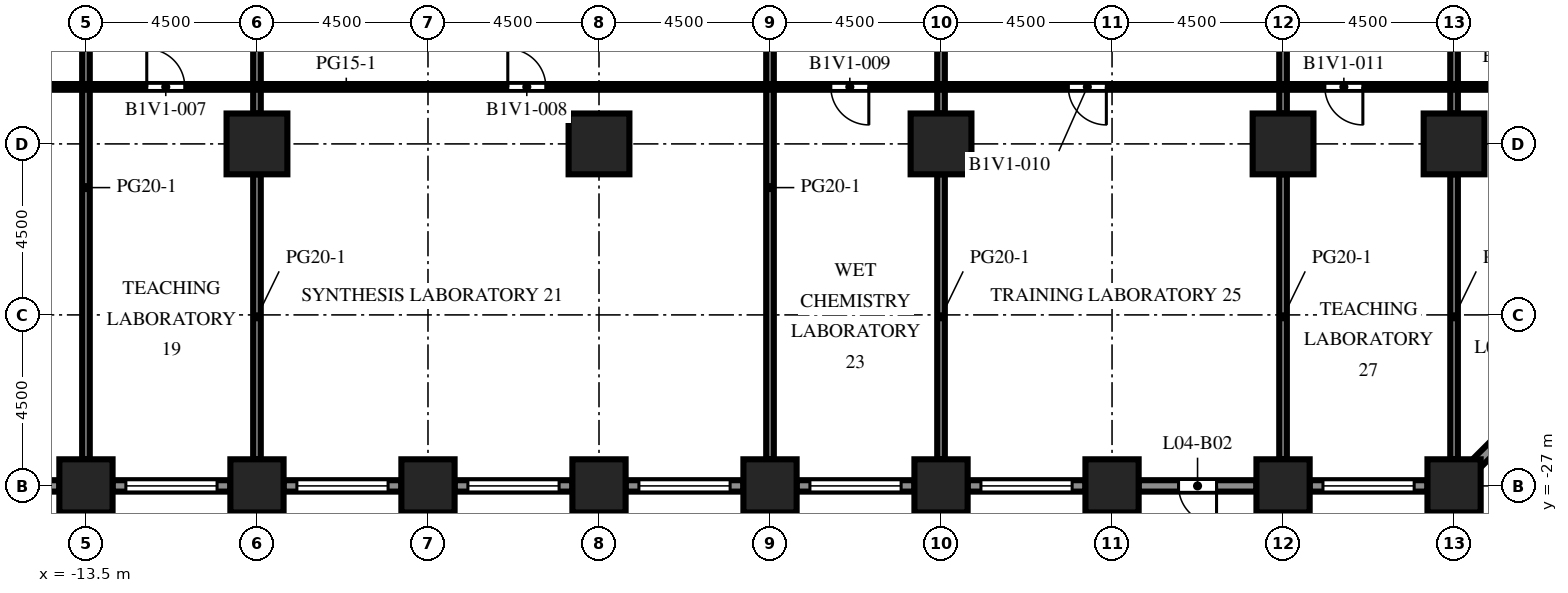
"""IFC4 building model, lengths in metres.
Left out: names, types, materials, properties, quantities, classifications, styles, units other than length and angle.
Written with IfcOpenShell. Run it as: python <this file> out.ifc"""

import sys

from ifc_helpers import new_model, si_unit, direction, frame, frame_2d, origin, origin_2d, place, context, subcontext, project, spatial, rectangle, extrude, element, fill, save


model = new_model("IFC4")
c1 = context("Model", 3, precision=1e-05, world=origin(), true_north=direction((0.0, 1.0)))
c2 = subcontext(c1, "Body", "Model", "MODEL_VIEW")
j1 = project(units=[si_unit("LENGTHUNIT", "METRE"), si_unit("PLANEANGLEUNIT", "RADIAN")], contexts=[c1])
p1 = place(None, origin())
s1 = spatial("IfcSite", under=j1, at=p1, CompositionType="ELEMENT")
p2 = place(p1, origin())
s2 = spatial("IfcBuilding", under=s1, at=p2, CompositionType="ELEMENT")
p3 = place(p2, frame((0.0, 0.0, 19.5)))
s3 = spatial("IfcBuildingStorey", under=s2, at=p3, CompositionType="ELEMENT", Elevation=19.5)
for number, where, z_axis, x_axis in (
    (1, (-13.5, -27.0, 0.0), (0.0, 0.0, 1.0), (1.0, 0.0, 0.0)),
    (2, (-9.0, -27.0, 0.0), (0.0, 0.0, 1.0), (1.0, 0.0, 0.0)),
    (3, (-4.5, -27.0, 0.0), (0.0, 0.0, 1.0), (1.0, 0.0, 0.0)),
    (4, (0.0, -27.0, 0.0), (0.0, 0.0, 1.0), (1.0, 0.0, 0.0)),
    (5, (4.5, -27.0, 0.0), (0.0, 0.0, 1.0), (1.0, 0.0, 0.0)),
    (6, (9.0, -27.0, 0.0), (0.0, 0.0, 1.0), (1.0, 0.0, 0.0)),
    (7, (13.5, -27.0, 0.0), (0.0, 0.0, 1.0), (1.0, 0.0, 0.0)),
    (8, (18.0, -27.0, 0.0), (0.0, 0.0, 1.0), (1.0, 0.0, 0.0)),
    (9, (22.5, -27.0, 0.0), (0.0, 0.0, 1.0), (1.0, 0.0, 0.0)),
):
    element("IfcColumn", number, at=place(p3, frame(where, z_axis=z_axis, x_axis=x_axis)), inside=s3, PredefinedType="COLUMN", context=c2, shape_type="SweptSolid", body=[
        extrude(rectangle(XDim=1.4, YDim=1.4, at=origin_2d()), origin(), (0.0, 0.0, 1.0), 4.1),
    ])
for number, where, z_axis, x_axis in (
    (10, (-9.0, -18.0, 0.0), (0.0, 0.0, 1.0), (1.0, 0.0, 0.0)),
    (11, (0.0, -18.0, 0.0), (0.0, 0.0, 1.0), (1.0, 0.0, 0.0)),
    (12, (9.0, -18.0, 0.0), (0.0, 0.0, 1.0), (1.0, 0.0, 0.0)),
    (13, (18.0, -18.0, 0.0), (0.0, 0.0, 1.0), (1.0, 0.0, 0.0)),
    (14, (22.5, -18.0, 0.0), (0.0, 0.0, 1.0), (1.0, 0.0, 0.0)),
):
    element("IfcColumn", number, at=place(p3, frame(where, z_axis=z_axis, x_axis=x_axis)), inside=s3, PredefinedType="COLUMN", context=c2, shape_type="SweptSolid", body=[
        extrude(rectangle(XDim=1.6, YDim=1.6, at=origin_2d()), origin(), (0.0, 0.0, 1.0), 4.1),
    ])
p4 = place(p3, frame((-14.2, -27.0, 0.0), z_axis=(0.0, 0.0, 1.0), x_axis=(-1.0, 0.0, 0.0)))
e15 = element("IfcWall", 15, at=p4, inside=s3, PredefinedType="SOLIDWALL", context=c2, shape_type="SweptSolid", body=[
    extrude(rectangle(XDim=3.1, YDim=0.3, at=frame_2d((1.55, 0.0))), origin(), (0.0, 0.0, 1.0), 2.75),
])
p5 = place(p4, frame((1.05, 0.0, 0.0)))
e16 = element("IfcOpeningElement", 16, at=p5, cuts=e15, PredefinedType="OPENING", context=c2, shape_type="SweptSolid", body=[
    extrude(rectangle(XDim=1.0, YDim=2.2, at=frame_2d((0.5, 1.1))), frame((0.0, 0.16, 0.0), z_axis=(0.0, -1.0, 0.0), x_axis=(1.0, 0.0, 0.0)), (0.0, 0.0, 1.0), 0.32),
])
p6 = place(p3, frame((-9.7, -27.0, 0.0), z_axis=(0.0, 0.0, 1.0), x_axis=(-1.0, 0.0, 0.0)))
e17 = element("IfcWall", 17, at=p6, inside=s3, PredefinedType="SOLIDWALL", context=c2, shape_type="SweptSolid", body=[
    extrude(rectangle(XDim=3.1, YDim=0.3, at=frame_2d((1.55, 0.0))), origin(), (0.0, 0.0, 1.0), 2.75),
])
p7 = place(p6, frame((0.35, 0.0, 0.8)))
e18 = element("IfcOpeningElement", 18, at=p7, cuts=e17, PredefinedType="OPENING", context=c2, shape_type="SweptSolid", body=[
    extrude(rectangle(XDim=2.4, YDim=1.7, at=frame_2d((1.2, 0.85))), frame((0.0, 0.16, 0.0), z_axis=(0.0, -1.0, 0.0), x_axis=(1.0, 0.0, 0.0)), (0.0, 0.0, 1.0), 0.32),
])
p8 = place(p3, frame((-5.2, -27.0, 0.0), z_axis=(0.0, 0.0, 1.0), x_axis=(-1.0, 0.0, 0.0)))
e19 = element("IfcWall", 19, at=p8, inside=s3, PredefinedType="SOLIDWALL", context=c2, shape_type="SweptSolid", body=[
    extrude(rectangle(XDim=3.1, YDim=0.3, at=frame_2d((1.55, 0.0))), origin(), (0.0, 0.0, 1.0), 2.75),
])
p9 = place(p8, frame((0.35, 0.0, 0.8)))
e20 = element("IfcOpeningElement", 20, at=p9, cuts=e19, PredefinedType="OPENING", context=c2, shape_type="SweptSolid", body=[
    extrude(rectangle(XDim=2.4, YDim=1.7, at=frame_2d((1.2, 0.85))), frame((0.0, 0.16, 0.0), z_axis=(0.0, -1.0, 0.0), x_axis=(1.0, 0.0, 0.0)), (0.0, 0.0, 1.0), 0.32),
])
p10 = place(p3, frame((-0.7, -27.0, 0.0), z_axis=(0.0, 0.0, 1.0), x_axis=(-1.0, 0.0, 0.0)))
e21 = element("IfcWall", 21, at=p10, inside=s3, PredefinedType="SOLIDWALL", context=c2, shape_type="SweptSolid", body=[
    extrude(rectangle(XDim=3.1, YDim=0.3, at=frame_2d((1.55, 0.0))), origin(), (0.0, 0.0, 1.0), 2.75),
])
p11 = place(p10, frame((0.35, 0.0, 0.8)))
e22 = element("IfcOpeningElement", 22, at=p11, cuts=e21, PredefinedType="OPENING", context=c2, shape_type="SweptSolid", body=[
    extrude(rectangle(XDim=2.4, YDim=1.7, at=frame_2d((1.2, 0.85))), frame((0.0, 0.16, 0.0), z_axis=(0.0, -1.0, 0.0), x_axis=(1.0, 0.0, 0.0)), (0.0, 0.0, 1.0), 0.32),
])
p12 = place(p3, frame((3.8, -27.0, 0.0), z_axis=(0.0, 0.0, 1.0), x_axis=(-1.0, 0.0, 0.0)))
e23 = element("IfcWall", 23, at=p12, inside=s3, PredefinedType="SOLIDWALL", context=c2, shape_type="SweptSolid", body=[
    extrude(rectangle(XDim=3.1, YDim=0.3, at=frame_2d((1.55, 0.0))), origin(), (0.0, 0.0, 1.0), 2.75),
])
p13 = place(p12, frame((0.35, 0.0, 0.8)))
e24 = element("IfcOpeningElement", 24, at=p13, cuts=e23, PredefinedType="OPENING", context=c2, shape_type="SweptSolid", body=[
    extrude(rectangle(XDim=2.4, YDim=1.7, at=frame_2d((1.2, 0.85))), frame((0.0, 0.16, 0.0), z_axis=(0.0, -1.0, 0.0), x_axis=(1.0, 0.0, 0.0)), (0.0, 0.0, 1.0), 0.32),
])
p14 = place(p3, frame((8.3, -27.0, 0.0), z_axis=(0.0, 0.0, 1.0), x_axis=(-1.0, 0.0, 0.0)))
e25 = element("IfcWall", 25, at=p14, inside=s3, PredefinedType="SOLIDWALL", context=c2, shape_type="SweptSolid", body=[
    extrude(rectangle(XDim=3.1, YDim=0.3, at=frame_2d((1.55, 0.0))), origin(), (0.0, 0.0, 1.0), 2.75),
])
p15 = place(p14, frame((0.35, 0.0, 0.8)))
e26 = element("IfcOpeningElement", 26, at=p15, cuts=e25, PredefinedType="OPENING", context=c2, shape_type="SweptSolid", body=[
    extrude(rectangle(XDim=2.4, YDim=1.7, at=frame_2d((1.2, 0.85))), frame((0.0, 0.16, 0.0), z_axis=(0.0, -1.0, 0.0), x_axis=(1.0, 0.0, 0.0)), (0.0, 0.0, 1.0), 0.32),
])
p16 = place(p3, frame((12.8, -27.0, 0.0), z_axis=(0.0, 0.0, 1.0), x_axis=(-1.0, 0.0, 0.0)))
e27 = element("IfcWall", 27, at=p16, inside=s3, PredefinedType="SOLIDWALL", context=c2, shape_type="SweptSolid", body=[
    extrude(rectangle(XDim=3.1, YDim=0.3, at=frame_2d((1.55, 0.0))), origin(), (0.0, 0.0, 1.0), 2.75),
])
p17 = place(p16, frame((0.35, 0.0, 0.8)))
e28 = element("IfcOpeningElement", 28, at=p17, cuts=e27, PredefinedType="OPENING", context=c2, shape_type="SweptSolid", body=[
    extrude(rectangle(XDim=2.4, YDim=1.7, at=frame_2d((1.2, 0.85))), frame((0.0, 0.16, 0.0), z_axis=(0.0, -1.0, 0.0), x_axis=(1.0, 0.0, 0.0)), (0.0, 0.0, 1.0), 0.32),
])
p18 = place(p3, frame((17.3, -27.0, 0.0), z_axis=(0.0, 0.0, 1.0), x_axis=(-1.0, 0.0, 0.0)))
e29 = element("IfcWall", 29, at=p18, inside=s3, PredefinedType="SOLIDWALL", context=c2, shape_type="SweptSolid", body=[
    extrude(rectangle(XDim=3.1, YDim=0.3, at=frame_2d((1.55, 0.0))), origin(), (0.0, 0.0, 1.0), 2.75),
])
p19 = place(p18, frame((1.05, 0.0, 0.0)))
e30 = element("IfcOpeningElement", 30, at=p19, cuts=e29, PredefinedType="OPENING", context=c2, shape_type="SweptSolid", body=[
    extrude(rectangle(XDim=1.0, YDim=2.2, at=frame_2d((0.5, 1.1))), frame((0.0, 0.16, 0.0), z_axis=(0.0, -1.0, 0.0), x_axis=(1.0, 0.0, 0.0)), (0.0, 0.0, 1.0), 0.32),
])
p20 = place(p3, frame((21.8, -27.0, 0.0), z_axis=(0.0, 0.0, 1.0), x_axis=(-1.0, 0.0, 0.0)))
e31 = element("IfcWall", 31, at=p20, inside=s3, PredefinedType="SOLIDWALL", context=c2, shape_type="SweptSolid", body=[
    extrude(rectangle(XDim=3.1, YDim=0.3, at=frame_2d((1.55, 0.0))), origin(), (0.0, 0.0, 1.0), 2.75),
])
p21 = place(p20, frame((0.35, 0.0, 0.8)))
e32 = element("IfcOpeningElement", 32, at=p21, cuts=e31, PredefinedType="OPENING", context=c2, shape_type="SweptSolid", body=[
    extrude(rectangle(XDim=2.4, YDim=1.7, at=frame_2d((1.2, 0.85))), frame((0.0, 0.16, 0.0), z_axis=(0.0, -1.0, 0.0), x_axis=(1.0, 0.0, 0.0)), (0.0, 0.0, 1.0), 0.32),
])
p22 = place(p3, frame((26.406, -23.094, 0.0), z_axis=(0.0, 0.0, 1.0), x_axis=(-0.707106781187, -0.707106781187, 0.0)))
e33 = element("IfcWall", 33, at=p22, inside=s3, PredefinedType="SOLIDWALL", context=c2, shape_type="SweptSolid", body=[
    extrude(rectangle(XDim=4.684, YDim=0.3, at=frame_2d((2.342, 0.0))), origin(), (0.0, 0.0, 1.0), 2.75),
])
p23 = place(p22, frame((1.742, 0.0, 0.0)))
e34 = element("IfcOpeningElement", 34, at=p23, cuts=e33, PredefinedType="OPENING", context=c2, shape_type="SweptSolid", body=[
    extrude(rectangle(XDim=1.2, YDim=2.2, at=frame_2d((0.6, 1.1))), frame((0.0, 0.16, 0.0), z_axis=(0.0, -1.0, 0.0), x_axis=(1.0, 0.0, 0.0)), (0.0, 0.0, 1.0), 0.32),
])
p24 = place(p3, frame((-13.5, -26.3, 0.0), z_axis=(0.0, 0.0, 1.0), x_axis=(0.0, 1.0, 0.0)))
e35 = element("IfcWall", 35, at=p24, inside=s3, PredefinedType="PARTITIONING", context=c2, shape_type="SweptSolid", body=[
    extrude(rectangle(XDim=14.3, YDim=0.2, at=frame_2d((7.15, 0.0))), origin(), (0.0, 0.0, 1.0), 3.65),
])
p25 = place(p3, frame((-9.0, -26.3, 0.0), z_axis=(0.0, 0.0, 1.0), x_axis=(0.0, 1.0, 0.0)))
e36 = element("IfcWall", 36, at=p25, inside=s3, PredefinedType="PARTITIONING", context=c2, shape_type="SweptSolid", body=[
    extrude(rectangle(XDim=7.5, YDim=0.2, at=frame_2d((3.75, 0.0))), origin(), (0.0, 0.0, 1.0), 3.65),
])
p26 = place(p3, frame((-9.0, -17.2, 0.0), z_axis=(0.0, 0.0, 1.0), x_axis=(0.0, 1.0, 0.0)))
e37 = element("IfcWall", 37, at=p26, inside=s3, PredefinedType="PARTITIONING", context=c2, shape_type="SweptSolid", body=[
    extrude(rectangle(XDim=5.2, YDim=0.2, at=frame_2d((2.6, 0.0))), origin(), (0.0, 0.0, 1.0), 3.65),
])
p27 = place(p3, frame((4.5, -26.3, 0.0), z_axis=(0.0, 0.0, 1.0), x_axis=(0.0, 1.0, 0.0)))
e38 = element("IfcWall", 38, at=p27, inside=s3, PredefinedType="PARTITIONING", context=c2, shape_type="SweptSolid", body=[
    extrude(rectangle(XDim=14.3, YDim=0.2, at=frame_2d((7.15, 0.0))), origin(), (0.0, 0.0, 1.0), 3.65),
])
p28 = place(p3, frame((9.0, -26.3, 0.0), z_axis=(0.0, 0.0, 1.0), x_axis=(0.0, 1.0, 0.0)))
e39 = element("IfcWall", 39, at=p28, inside=s3, PredefinedType="PARTITIONING", context=c2, shape_type="SweptSolid", body=[
    extrude(rectangle(XDim=7.5, YDim=0.2, at=frame_2d((3.75, 0.0))), origin(), (0.0, 0.0, 1.0), 3.65),
])
p29 = place(p3, frame((9.0, -17.2, 0.0), z_axis=(0.0, 0.0, 1.0), x_axis=(0.0, 1.0, 0.0)))
e40 = element("IfcWall", 40, at=p29, inside=s3, PredefinedType="PARTITIONING", context=c2, shape_type="SweptSolid", body=[
    extrude(rectangle(XDim=5.2, YDim=0.2, at=frame_2d((2.6, 0.0))), origin(), (0.0, 0.0, 1.0), 3.65),
])
p30 = place(p3, frame((18.0, -26.3, 0.0), z_axis=(0.0, 0.0, 1.0), x_axis=(0.0, 1.0, 0.0)))
e41 = element("IfcWall", 41, at=p30, inside=s3, PredefinedType="PARTITIONING", context=c2, shape_type="SweptSolid", body=[
    extrude(rectangle(XDim=7.5, YDim=0.2, at=frame_2d((3.75, 0.0))), origin(), (0.0, 0.0, 1.0), 3.65),
])
p31 = place(p3, frame((18.0, -17.2, 0.0), z_axis=(0.0, 0.0, 1.0), x_axis=(0.0, 1.0, 0.0)))
e42 = element("IfcWall", 42, at=p31, inside=s3, PredefinedType="PARTITIONING", context=c2, shape_type="SweptSolid", body=[
    extrude(rectangle(XDim=5.2, YDim=0.2, at=frame_2d((2.6, 0.0))), origin(), (0.0, 0.0, 1.0), 3.65),
])
p32 = place(p3, frame((22.5, -26.3, 0.0), z_axis=(0.0, 0.0, 1.0), x_axis=(0.0, 1.0, 0.0)))
e43 = element("IfcWall", 43, at=p32, inside=s3, PredefinedType="PARTITIONING", context=c2, shape_type="SweptSolid", body=[
    extrude(rectangle(XDim=7.5, YDim=0.2, at=frame_2d((3.75, 0.0))), origin(), (0.0, 0.0, 1.0), 3.65),
])
p33 = place(p3, frame((22.5, -17.2, 0.0), z_axis=(0.0, 0.0, 1.0), x_axis=(0.0, 1.0, 0.0)))
e44 = element("IfcWall", 44, at=p33, inside=s3, PredefinedType="PARTITIONING", context=c2, shape_type="SweptSolid", body=[
    extrude(rectangle(XDim=5.2, YDim=0.2, at=frame_2d((2.6, 0.0))), origin(), (0.0, 0.0, 1.0), 3.65),
])
p34 = place(p3, frame((26.85, -16.5, 0.0), z_axis=(0.0, 0.0, 1.0), x_axis=(-1.0, 0.0, 0.0)))
e45 = element("IfcWall", 45, at=p34, inside=s3, PredefinedType="PARTITIONING", context=c2, shape_type="SweptSolid", body=[
    extrude(rectangle(XDim=53.7, YDim=0.15, at=frame_2d((26.85, 0.0))), origin(), (0.0, 0.0, 1.0), 3.65),
])
p35 = place(p34, frame((50.75, 0.0, 0.0)))
e46 = element("IfcOpeningElement", 46, at=p35, cuts=e45, PredefinedType="OPENING", context=c2, shape_type="SweptSolid", body=[
    extrude(rectangle(XDim=1.0, YDim=2.1, at=frame_2d((0.5, 1.05))), frame((0.0, 0.085, 0.0), z_axis=(0.0, -1.0, 0.0), x_axis=(1.0, 0.0, 0.0)), (0.0, 0.0, 1.0), 0.17),
])
p36 = place(p34, frame((45.75, 0.0, 0.0)))
e47 = element("IfcOpeningElement", 47, at=p36, cuts=e45, PredefinedType="OPENING", context=c2, shape_type="SweptSolid", body=[
    extrude(rectangle(XDim=1.0, YDim=2.1, at=frame_2d((0.5, 1.05))), frame((0.0, 0.085, 0.0), z_axis=(0.0, -1.0, 0.0), x_axis=(1.0, 0.0, 0.0)), (0.0, 0.0, 1.0), 0.17),
])
p37 = place(p34, frame((37.75, 0.0, 0.0)))
e48 = element("IfcOpeningElement", 48, at=p37, cuts=e45, PredefinedType="OPENING", context=c2, shape_type="SweptSolid", body=[
    extrude(rectangle(XDim=1.0, YDim=2.1, at=frame_2d((0.5, 1.05))), frame((0.0, 0.085, 0.0), z_axis=(0.0, -1.0, 0.0), x_axis=(1.0, 0.0, 0.0)), (0.0, 0.0, 1.0), 0.17),
])
p38 = place(p34, frame((28.25, 0.0, 0.0)))
e49 = element("IfcOpeningElement", 49, at=p38, cuts=e45, PredefinedType="OPENING", context=c2, shape_type="SweptSolid", body=[
    extrude(rectangle(XDim=1.0, YDim=2.1, at=frame_2d((0.5, 1.05))), frame((0.0, 0.085, 0.0), z_axis=(0.0, -1.0, 0.0), x_axis=(1.0, 0.0, 0.0)), (0.0, 0.0, 1.0), 0.17),
])
p39 = place(p34, frame((19.75, 0.0, 0.0)))
e50 = element("IfcOpeningElement", 50, at=p39, cuts=e45, PredefinedType="OPENING", context=c2, shape_type="SweptSolid", body=[
    extrude(rectangle(XDim=1.0, YDim=2.1, at=frame_2d((0.5, 1.05))), frame((0.0, 0.085, 0.0), z_axis=(0.0, -1.0, 0.0), x_axis=(1.0, 0.0, 0.0)), (0.0, 0.0, 1.0), 0.17),
])
p40 = place(p34, frame((13.5, 0.0, 0.0)))
e51 = element("IfcOpeningElement", 51, at=p40, cuts=e45, PredefinedType="OPENING", context=c2, shape_type="SweptSolid", body=[
    extrude(rectangle(XDim=1.0, YDim=2.1, at=frame_2d((0.5, 1.05))), frame((0.0, 0.085, 0.0), z_axis=(0.0, -1.0, 0.0), x_axis=(1.0, 0.0, 0.0)), (0.0, 0.0, 1.0), 0.17),
])
p41 = place(p34, frame((6.75, 0.0, 0.0)))
e52 = element("IfcOpeningElement", 52, at=p41, cuts=e45, PredefinedType="OPENING", context=c2, shape_type="SweptSolid", body=[
    extrude(rectangle(XDim=1.0, YDim=2.1, at=frame_2d((0.5, 1.05))), frame((0.0, 0.085, 0.0), z_axis=(0.0, -1.0, 0.0), x_axis=(1.0, 0.0, 0.0)), (0.0, 0.0, 1.0), 0.17),
])
p42 = place(p34, frame((1.25, 0.0, 0.0)))
e53 = element("IfcOpeningElement", 53, at=p42, cuts=e45, PredefinedType="OPENING", context=c2, shape_type="SweptSolid", body=[
    extrude(rectangle(XDim=1.0, YDim=2.1, at=frame_2d((0.5, 1.05))), frame((0.0, 0.085, 0.0), z_axis=(0.0, -1.0, 0.0), x_axis=(1.0, 0.0, 0.0)), (0.0, 0.0, 1.0), 0.17),
])
p43 = place(p7, origin())
e54 = element("IfcWindow", 54, at=p43, inside=s3, PartitioningType="SINGLE_PANEL", PredefinedType="WINDOW", context=c2, shape_type="SweptSolid", body=[
    extrude(rectangle(XDim=2.4, YDim=1.7, at=frame_2d((1.2, 0.85))), frame((0.0, 0.03, 0.0), z_axis=(0.0, -1.0, 0.0), x_axis=(1.0, 0.0, 0.0)), (0.0, 0.0, 1.0), 0.06),
])
fill(e18, e54)
p44 = place(p9, origin())
e55 = element("IfcWindow", 55, at=p44, inside=s3, PartitioningType="SINGLE_PANEL", PredefinedType="WINDOW", context=c2, shape_type="SweptSolid", body=[
    extrude(rectangle(XDim=2.4, YDim=1.7, at=frame_2d((1.2, 0.85))), frame((0.0, 0.03, 0.0), z_axis=(0.0, -1.0, 0.0), x_axis=(1.0, 0.0, 0.0)), (0.0, 0.0, 1.0), 0.06),
])
fill(e20, e55)
p45 = place(p11, origin())
e56 = element("IfcWindow", 56, at=p45, inside=s3, PartitioningType="SINGLE_PANEL", PredefinedType="WINDOW", context=c2, shape_type="SweptSolid", body=[
    extrude(rectangle(XDim=2.4, YDim=1.7, at=frame_2d((1.2, 0.85))), frame((0.0, 0.03, 0.0), z_axis=(0.0, -1.0, 0.0), x_axis=(1.0, 0.0, 0.0)), (0.0, 0.0, 1.0), 0.06),
])
fill(e22, e56)
p46 = place(p13, origin())
e57 = element("IfcWindow", 57, at=p46, inside=s3, PartitioningType="SINGLE_PANEL", PredefinedType="WINDOW", context=c2, shape_type="SweptSolid", body=[
    extrude(rectangle(XDim=2.4, YDim=1.7, at=frame_2d((1.2, 0.85))), frame((0.0, 0.03, 0.0), z_axis=(0.0, -1.0, 0.0), x_axis=(1.0, 0.0, 0.0)), (0.0, 0.0, 1.0), 0.06),
])
fill(e24, e57)
p47 = place(p15, origin())
e58 = element("IfcWindow", 58, at=p47, inside=s3, PartitioningType="SINGLE_PANEL", PredefinedType="WINDOW", context=c2, shape_type="SweptSolid", body=[
    extrude(rectangle(XDim=2.4, YDim=1.7, at=frame_2d((1.2, 0.85))), frame((0.0, 0.03, 0.0), z_axis=(0.0, -1.0, 0.0), x_axis=(1.0, 0.0, 0.0)), (0.0, 0.0, 1.0), 0.06),
])
fill(e26, e58)
p48 = place(p17, origin())
e59 = element("IfcWindow", 59, at=p48, inside=s3, PartitioningType="SINGLE_PANEL", PredefinedType="WINDOW", context=c2, shape_type="SweptSolid", body=[
    extrude(rectangle(XDim=2.4, YDim=1.7, at=frame_2d((1.2, 0.85))), frame((0.0, 0.03, 0.0), z_axis=(0.0, -1.0, 0.0), x_axis=(1.0, 0.0, 0.0)), (0.0, 0.0, 1.0), 0.06),
])
fill(e28, e59)
p49 = place(p19, origin())
e60 = element("IfcDoor", 60, at=p49, inside=s3, OperationType="SINGLE_SWING_LEFT", PredefinedType="DOOR", context=c2, shape_type="SweptSolid", body=[
    extrude(rectangle(XDim=1.0, YDim=2.2, at=frame_2d((0.5, 1.1))), frame((0.0, 0.025, 0.0), z_axis=(0.0, -1.0, 0.0), x_axis=(1.0, 0.0, 0.0)), (0.0, 0.0, 1.0), 0.05),
])
fill(e30, e60)
p50 = place(p21, origin())
e61 = element("IfcWindow", 61, at=p50, inside=s3, PartitioningType="SINGLE_PANEL", PredefinedType="WINDOW", context=c2, shape_type="SweptSolid", body=[
    extrude(rectangle(XDim=2.4, YDim=1.7, at=frame_2d((1.2, 0.85))), frame((0.0, 0.03, 0.0), z_axis=(0.0, -1.0, 0.0), x_axis=(1.0, 0.0, 0.0)), (0.0, 0.0, 1.0), 0.06),
])
fill(e32, e61)
p51 = place(p37, origin())
e62 = element("IfcDoor", 62, at=p51, inside=s3, OperationType="SINGLE_SWING_RIGHT", PredefinedType="DOOR", context=c2, shape_type="SweptSolid", body=[
    extrude(rectangle(XDim=1.0, YDim=2.1, at=frame_2d((0.5, 1.05))), frame((0.0, 0.025, 0.0), z_axis=(0.0, -1.0, 0.0), x_axis=(1.0, 0.0, 0.0)), (0.0, 0.0, 1.0), 0.05),
])
fill(e48, e62)
p52 = place(p38, origin())
e63 = element("IfcDoor", 63, at=p52, inside=s3, OperationType="SINGLE_SWING_RIGHT", PredefinedType="DOOR", context=c2, shape_type="SweptSolid", body=[
    extrude(rectangle(XDim=1.0, YDim=2.1, at=frame_2d((0.5, 1.05))), frame((0.0, 0.025, 0.0), z_axis=(0.0, -1.0, 0.0), x_axis=(1.0, 0.0, 0.0)), (0.0, 0.0, 1.0), 0.05),
])
fill(e49, e63)
p53 = place(p39, origin())
e64 = element("IfcDoor", 64, at=p53, inside=s3, OperationType="SINGLE_SWING_LEFT", PredefinedType="DOOR", context=c2, shape_type="SweptSolid", body=[
    extrude(rectangle(XDim=1.0, YDim=2.1, at=frame_2d((0.5, 1.05))), frame((0.0, 0.025, 0.0), z_axis=(0.0, -1.0, 0.0), x_axis=(1.0, 0.0, 0.0)), (0.0, 0.0, 1.0), 0.05),
])
fill(e50, e64)
p54 = place(p40, origin())
e65 = element("IfcDoor", 65, at=p54, inside=s3, OperationType="SINGLE_SWING_LEFT", PredefinedType="DOOR", context=c2, shape_type="SweptSolid", body=[
    extrude(rectangle(XDim=1.0, YDim=2.1, at=frame_2d((0.5, 1.05))), frame((0.0, 0.025, 0.0), z_axis=(0.0, -1.0, 0.0), x_axis=(1.0, 0.0, 0.0)), (0.0, 0.0, 1.0), 0.05),
])
fill(e51, e65)
p55 = place(p41, origin())
e66 = element("IfcDoor", 66, at=p55, inside=s3, OperationType="SINGLE_SWING_LEFT", PredefinedType="DOOR", context=c2, shape_type="SweptSolid", body=[
    extrude(rectangle(XDim=1.0, YDim=2.1, at=frame_2d((0.5, 1.05))), frame((0.0, 0.025, 0.0), z_axis=(0.0, -1.0, 0.0), x_axis=(1.0, 0.0, 0.0)), (0.0, 0.0, 1.0), 0.05),
])
fill(e52, e66)
save(model, sys.argv[1])
